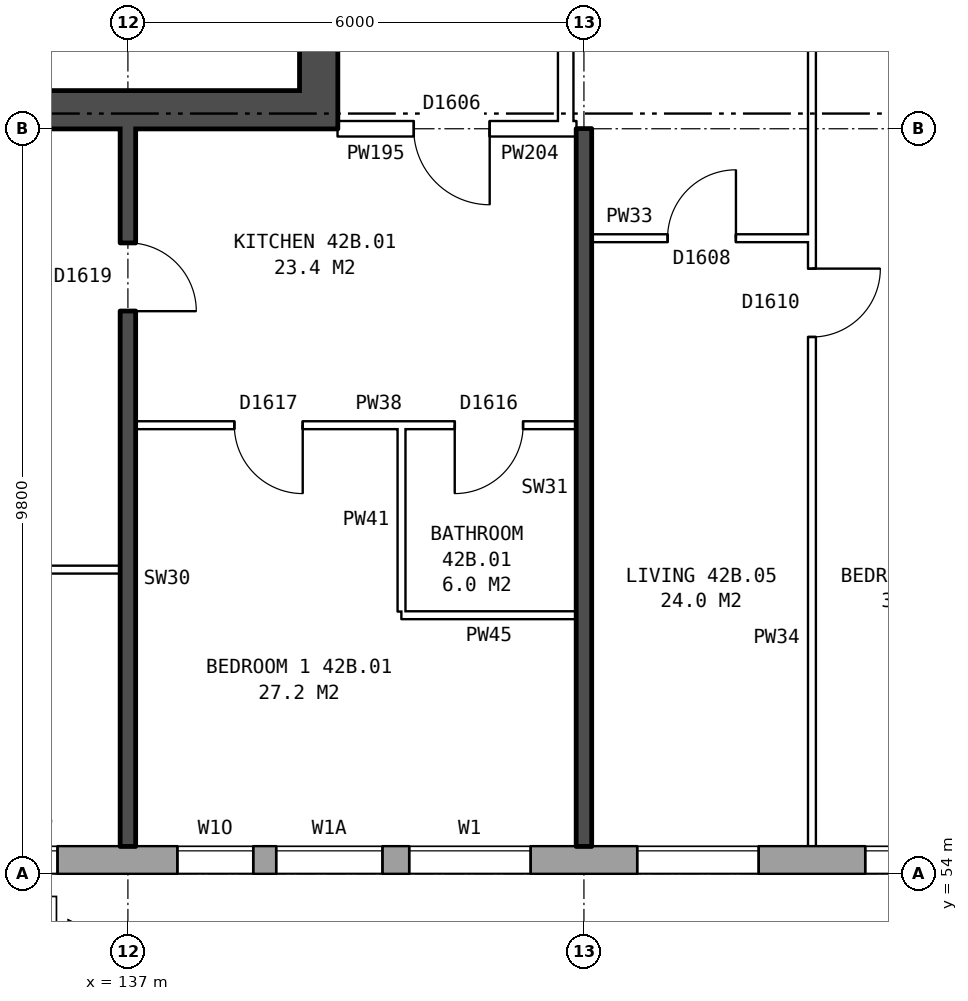
"""IFC4 building model, lengths in metres.
Left out: names, types, materials, properties, quantities, classifications, styles, units other than length and angle.
Written with IfcOpenShell. Run it as: python <this file> out.ifc"""

import sys

from ifc_helpers import new_model, si_unit, direction, frame, frame_2d, origin, place, context, subcontext, project, spatial, rectangle, extrude, element, fill, save


model = new_model("IFC4")
c1 = context("Model", 3, precision=1e-05, world=origin(), true_north=direction((0.0, 1.0)))
c2 = subcontext(c1, "Body", "Model", "MODEL_VIEW")
j1 = project(units=[si_unit("LENGTHUNIT", "METRE"), si_unit("PLANEANGLEUNIT", "RADIAN")], contexts=[c1])
p1 = place(None, origin())
s1 = spatial("IfcSite", under=j1, at=p1, CompositionType="ELEMENT")
p2 = place(p1, origin())
s2 = spatial("IfcBuilding", under=s1, at=p2, CompositionType="ELEMENT")
p3 = place(p2, frame((0.0, 0.0, 151.6)))
s3 = spatial("IfcBuildingStorey", under=s2, at=p3, CompositionType="ELEMENT", Elevation=151.6)
p4 = place(p3, frame((134.075, 54.18, 0.0), z_axis=(0.0, 0.0, 1.0), x_axis=(1.0, 0.0, 0.0)))
e1 = element("IfcWall", 1, at=p4, inside=s3, PredefinedType="STANDARD", context=c2, shape_type="SweptSolid", body=[
    extrude(rectangle(XDim=34.351, YDim=0.36, at=frame_2d((17.175, 0.0))), origin(), (0.0, 0.0, 1.0), 2.85),
])
p5 = place(p4, frame((0.3, 0.0, 0.8)))
e2 = element("IfcOpeningElement", 2, at=p5, cuts=e1, PredefinedType="OPENING", context=c2, shape_type="SweptSolid", body=[
    extrude(rectangle(XDim=0.8, YDim=1.8, at=frame_2d((0.4, 0.9))), frame((0.0, 0.19, 0.0), z_axis=(0.0, -1.0, 0.0), x_axis=(1.0, 0.0, 0.0)), (0.0, 0.0, 1.0), 0.38),
])
p6 = place(p4, frame((3.575, 0.0, 0.8)))
e3 = element("IfcOpeningElement", 3, at=p6, cuts=e1, PredefinedType="OPENING", context=c2, shape_type="SweptSolid", body=[
    extrude(rectangle(XDim=1.0, YDim=1.2, at=frame_2d((0.5, 0.6))), frame((0.0, 0.19, 0.0), z_axis=(0.0, -1.0, 0.0), x_axis=(1.0, 0.0, 0.0)), (0.0, 0.0, 1.0), 0.38),
])
p7 = place(p4, frame((6.625, 0.0, 0.8)))
e4 = element("IfcOpeningElement", 4, at=p7, cuts=e1, PredefinedType="OPENING", context=c2, shape_type="SweptSolid", body=[
    extrude(rectangle(XDim=1.6, YDim=1.8, at=frame_2d((0.8, 0.9))), frame((0.0, 0.19, 0.0), z_axis=(0.0, -1.0, 0.0), x_axis=(1.0, 0.0, 0.0)), (0.0, 0.0, 1.0), 0.38),
])
p8 = place(p4, frame((9.625, 0.0, 0.8)))
e5 = element("IfcOpeningElement", 5, at=p8, cuts=e1, PredefinedType="OPENING", context=c2, shape_type="SweptSolid", body=[
    extrude(rectangle(XDim=1.6, YDim=1.8, at=frame_2d((0.8, 0.9))), frame((0.0, 0.19, 0.0), z_axis=(0.0, -1.0, 0.0), x_axis=(1.0, 0.0, 0.0)), (0.0, 0.0, 1.0), 0.38),
])
p9 = place(p4, frame((12.625, 0.0, 0.8)))
e6 = element("IfcOpeningElement", 6, at=p9, cuts=e1, PredefinedType="OPENING", context=c2, shape_type="SweptSolid", body=[
    extrude(rectangle(XDim=1.6, YDim=1.8, at=frame_2d((0.8, 0.9))), frame((0.0, 0.19, 0.0), z_axis=(0.0, -1.0, 0.0), x_axis=(1.0, 0.0, 0.0)), (0.0, 0.0, 1.0), 0.38),
])
p10 = place(p4, frame((15.625, 0.0, 0.8)))
e7 = element("IfcOpeningElement", 7, at=p10, cuts=e1, PredefinedType="OPENING", context=c2, shape_type="SweptSolid", body=[
    extrude(rectangle(XDim=1.6, YDim=1.8, at=frame_2d((0.8, 0.9))), frame((0.0, 0.19, 0.0), z_axis=(0.0, -1.0, 0.0), x_axis=(1.0, 0.0, 0.0)), (0.0, 0.0, 1.0), 0.38),
])
p11 = place(p4, frame((18.625, 0.0, 0.8)))
e8 = element("IfcOpeningElement", 8, at=p11, cuts=e1, PredefinedType="OPENING", context=c2, shape_type="SweptSolid", body=[
    extrude(rectangle(XDim=1.6, YDim=1.8, at=frame_2d((0.8, 0.9))), frame((0.0, 0.19, 0.0), z_axis=(0.0, -1.0, 0.0), x_axis=(1.0, 0.0, 0.0)), (0.0, 0.0, 1.0), 0.38),
])
p12 = place(p4, frame((21.625, 0.0, 0.8)))
e9 = element("IfcOpeningElement", 9, at=p12, cuts=e1, PredefinedType="OPENING", context=c2, shape_type="SweptSolid", body=[
    extrude(rectangle(XDim=1.6, YDim=1.8, at=frame_2d((0.8, 0.9))), frame((0.0, 0.19, 0.0), z_axis=(0.0, -1.0, 0.0), x_axis=(1.0, 0.0, 0.0)), (0.0, 0.0, 1.0), 0.38),
])
p13 = place(p4, frame((24.625, 0.0, 0.8)))
e10 = element("IfcOpeningElement", 10, at=p13, cuts=e1, PredefinedType="OPENING", context=c2, shape_type="SweptSolid", body=[
    extrude(rectangle(XDim=1.6, YDim=1.8, at=frame_2d((0.8, 0.9))), frame((0.0, 0.19, 0.0), z_axis=(0.0, -1.0, 0.0), x_axis=(1.0, 0.0, 0.0)), (0.0, 0.0, 1.0), 0.38),
])
p14 = place(p4, frame((27.625, 0.0, 0.8)))
e11 = element("IfcOpeningElement", 11, at=p14, cuts=e1, PredefinedType="OPENING", context=c2, shape_type="SweptSolid", body=[
    extrude(rectangle(XDim=1.6, YDim=1.8, at=frame_2d((0.8, 0.9))), frame((0.0, 0.19, 0.0), z_axis=(0.0, -1.0, 0.0), x_axis=(1.0, 0.0, 0.0)), (0.0, 0.0, 1.0), 0.38),
])
p15 = place(p4, frame((29.525, 0.0, 0.8)))
e12 = element("IfcOpeningElement", 12, at=p15, cuts=e1, PredefinedType="OPENING", context=c2, shape_type="SweptSolid", body=[
    extrude(rectangle(XDim=0.6, YDim=1.8, at=frame_2d((0.3, 0.9))), frame((0.0, 0.19, 0.0), z_axis=(0.0, -1.0, 0.0), x_axis=(1.0, 0.0, 0.0)), (0.0, 0.0, 1.0), 0.38),
])
p16 = place(p4, frame((1.4, 0.0, 1.6)))
e13 = element("IfcOpeningElement", 13, at=p16, cuts=e1, PredefinedType="OPENING", context=c2, shape_type="SweptSolid", body=[
    extrude(rectangle(XDim=0.6, YDim=0.9, at=frame_2d((0.3, 0.45))), frame((0.0, 0.19, 0.0), z_axis=(0.0, -1.0, 0.0), x_axis=(1.0, 0.0, 0.0)), (0.0, 0.0, 1.0), 0.38),
])
p17 = place(p4, frame((4.875, 0.0, 0.8)))
e14 = element("IfcOpeningElement", 14, at=p17, cuts=e1, PredefinedType="OPENING", context=c2, shape_type="SweptSolid", body=[
    extrude(rectangle(XDim=1.4, YDim=1.8, at=frame_2d((0.7, 0.9))), frame((0.0, 0.19, 0.0), z_axis=(0.0, -1.0, 0.0), x_axis=(1.0, 0.0, 0.0)), (0.0, 0.0, 1.0), 0.38),
])
p18 = place(p4, frame((30.425, 0.0, 0.8)))
e15 = element("IfcOpeningElement", 15, at=p18, cuts=e1, PredefinedType="OPENING", context=c2, shape_type="SweptSolid", body=[
    extrude(rectangle(XDim=0.6, YDim=0.9, at=frame_2d((0.3, 0.45))), frame((0.0, 0.19, 0.0), z_axis=(0.0, -1.0, 0.0), x_axis=(1.0, 0.0, 0.0)), (0.0, 0.0, 1.0), 0.38),
])
p19 = place(p3, frame((139.51, 63.8, 0.0), z_axis=(0.0, 0.0, 1.0), x_axis=(0.0, 1.0, 0.0)))
e16 = element("IfcWall", 16, at=p19, inside=s3, PredefinedType="SHEAR", context=c2, shape_type="SweptSolid", body=[
    extrude(rectangle(XDim=12.4, YDim=0.5, at=frame_2d((6.2, 0.0))), origin(), (0.0, 0.0, 1.0), 2.85),
])
p20 = place(p19, frame((1.325, 0.0, 0.0)))
e17 = element("IfcOpeningElement", 17, at=p20, cuts=e16, PredefinedType="OPENING", context=c2, shape_type="SweptSolid", body=[
    extrude(rectangle(XDim=1.1, YDim=2.1, at=frame_2d((0.55, 1.05))), frame((0.0, 0.26, 0.0), z_axis=(0.0, -1.0, 0.0), x_axis=(1.0, 0.0, 0.0)), (0.0, 0.0, 1.0), 0.52),
])
p21 = place(p19, frame((3.6, 0.0, 0.0)))
e18 = element("IfcOpeningElement", 18, at=p21, cuts=e16, PredefinedType="OPENING", context=c2, shape_type="SweptSolid", body=[
    extrude(rectangle(XDim=1.1, YDim=2.1, at=frame_2d((0.55, 1.05))), frame((0.0, 0.26, 0.0), z_axis=(0.0, -1.0, 0.0), x_axis=(1.0, 0.0, 0.0)), (0.0, 0.0, 1.0), 0.52),
])
p22 = place(p19, frame((5.8, 0.0, 0.0)))
e19 = element("IfcOpeningElement", 19, at=p22, cuts=e16, PredefinedType="OPENING", context=c2, shape_type="SweptSolid", body=[
    extrude(rectangle(XDim=1.1, YDim=2.1, at=frame_2d((0.55, 1.05))), frame((0.0, 0.26, 0.0), z_axis=(0.0, -1.0, 0.0), x_axis=(1.0, 0.0, 0.0)), (0.0, 0.0, 1.0), 0.52),
])
p23 = place(p19, frame((9.9, 0.0, 0.0)))
e20 = element("IfcOpeningElement", 20, at=p23, cuts=e16, PredefinedType="OPENING", context=c2, shape_type="SweptSolid", body=[
    extrude(rectangle(XDim=1.1, YDim=2.1, at=frame_2d((0.55, 1.05))), frame((0.0, 0.26, 0.0), z_axis=(0.0, -1.0, 0.0), x_axis=(1.0, 0.0, 0.0)), (0.0, 0.0, 1.0), 0.52),
])
p24 = place(p19, frame((8.125, 0.0, 0.0)))
e21 = element("IfcOpeningElement", 21, at=p24, cuts=e16, PredefinedType="OPENING", context=c2, shape_type="SweptSolid", body=[
    extrude(rectangle(XDim=0.85, YDim=2.1, at=frame_2d((0.425, 1.05))), frame((0.0, 0.26, 0.0), z_axis=(0.0, -1.0, 0.0), x_axis=(1.0, 0.0, 0.0)), (0.0, 0.0, 1.0), 0.52),
])
p25 = place(p3, frame((139.26, 64.05, 0.0), z_axis=(0.0, 0.0, 1.0), x_axis=(-1.0, 0.0, 0.0)))
e22 = element("IfcWall", 22, at=p25, inside=s3, PredefinedType="SHEAR", context=c2, shape_type="SweptSolid", body=[
    extrude(rectangle(XDim=7.4, YDim=0.5, at=frame_2d((3.7, 0.0))), origin(), (0.0, 0.0, 1.0), 2.85),
])
p26 = place(p3, frame((142.76, 63.9, 0.0), z_axis=(0.0, 0.0, 1.0), x_axis=(0.0, 1.0, 0.0)))
e23 = element("IfcWall", 23, at=p26, inside=s3, PredefinedType="PARTITIONING", context=c2, shape_type="SweptSolid", body=[
    extrude(rectangle(XDim=12.2, YDim=0.2, at=frame_2d((6.1, 0.0))), origin(), (0.0, 0.0, 1.0), 2.85),
])
p27 = place(p26, frame((5.1, 0.0, 0.0)))
e24 = element("IfcOpeningElement", 24, at=p27, cuts=e23, PredefinedType="OPENING", context=c2, shape_type="SweptSolid", body=[
    extrude(rectangle(XDim=2.0, YDim=2.1, at=frame_2d((1.0, 1.05))), frame((0.0, 0.11, 0.0), z_axis=(0.0, -1.0, 0.0), x_axis=(1.0, 0.0, 0.0)), (0.0, 0.0, 1.0), 0.22),
])
p28 = place(p3, frame((140.6, 57.4, 0.0), z_axis=(0.0, 0.0, 1.0), x_axis=(1.0, 0.0, 0.0)))
e25 = element("IfcWall", 25, at=p28, inside=s3, PredefinedType="PARTITIONING", context=c2, shape_type="SweptSolid", body=[
    extrude(rectangle(XDim=2.3, YDim=0.1, at=frame_2d((1.15, 0.0))), origin(), (0.0, 0.0, 1.0), 2.85),
])
p29 = place(p3, frame((131.36, 58.0, 0.0), z_axis=(0.0, 0.0, 1.0), x_axis=(1.0, 0.0, 0.0)))
e26 = element("IfcWall", 26, at=p29, inside=s3, PredefinedType="PARTITIONING", context=c2, shape_type="SweptSolid", body=[
    extrude(rectangle(XDim=5.54, YDim=0.1, at=frame_2d((2.77, 0.0))), origin(), (0.0, 0.0, 1.0), 2.85),
])
p30 = place(p29, frame((2.32, 0.0, 0.0)))
e27 = element("IfcOpeningElement", 27, at=p30, cuts=e26, PredefinedType="OPENING", context=c2, shape_type="SweptSolid", body=[
    extrude(rectangle(XDim=0.9, YDim=2.1, at=frame_2d((0.45, 1.05))), frame((0.0, 0.06, 0.0), z_axis=(0.0, -1.0, 0.0), x_axis=(1.0, 0.0, 0.0)), (0.0, 0.0, 1.0), 0.12),
])
p31 = place(p3, frame((137.1, 59.9, 0.0), z_axis=(0.0, 0.0, 1.0), x_axis=(1.0, 0.0, 0.0)))
e28 = element("IfcWall", 28, at=p31, inside=s3, PredefinedType="PARTITIONING", context=c2, shape_type="SweptSolid", body=[
    extrude(rectangle(XDim=5.8, YDim=0.1, at=frame_2d((2.9, 0.0))), origin(), (0.0, 0.0, 1.0), 2.85),
])
p32 = place(p31, frame((1.3, 0.0, 0.0)))
e29 = element("IfcOpeningElement", 29, at=p32, cuts=e28, PredefinedType="OPENING", context=c2, shape_type="SweptSolid", body=[
    extrude(rectangle(XDim=0.9, YDim=2.1, at=frame_2d((0.45, 1.05))), frame((0.0, 0.06, 0.0), z_axis=(0.0, -1.0, 0.0), x_axis=(1.0, 0.0, 0.0)), (0.0, 0.0, 1.0), 0.12),
])
p33 = place(p31, frame((4.2, 0.0, 0.0)))
e30 = element("IfcOpeningElement", 30, at=p33, cuts=e28, PredefinedType="OPENING", context=c2, shape_type="SweptSolid", body=[
    extrude(rectangle(XDim=0.9, YDim=2.1, at=frame_2d((0.45, 1.05))), frame((0.0, 0.06, 0.0), z_axis=(0.0, -1.0, 0.0), x_axis=(1.0, 0.0, 0.0)), (0.0, 0.0, 1.0), 0.12),
])
p34 = place(p3, frame((143.1, 62.36, 0.0), z_axis=(0.0, 0.0, 1.0), x_axis=(1.0, 0.0, 0.0)))
e31 = element("IfcWall", 31, at=p34, inside=s3, PredefinedType="PARTITIONING", context=c2, shape_type="SweptSolid", body=[
    extrude(rectangle(XDim=2.9, YDim=0.1, at=frame_2d((1.45, 0.0))), origin(), (0.0, 0.0, 1.0), 2.85),
])
p35 = place(p34, frame((1.0, 0.0, 0.0)))
e32 = element("IfcOpeningElement", 32, at=p35, cuts=e31, PredefinedType="OPENING", context=c2, shape_type="SweptSolid", body=[
    extrude(rectangle(XDim=0.9, YDim=2.1, at=frame_2d((0.45, 1.05))), frame((0.0, 0.06, 0.0), z_axis=(0.0, -1.0, 0.0), x_axis=(1.0, 0.0, 0.0)), (0.0, 0.0, 1.0), 0.12),
])
p36 = place(p3, frame((139.76, 63.8, 0.0), z_axis=(0.0, 0.0, 1.0), x_axis=(1.0, 0.0, 0.0)))
e33 = element("IfcWall", 33, at=p36, inside=s3, PredefinedType="PARTITIONING", context=c2, shape_type="SweptSolid", body=[
    extrude(rectangle(XDim=3.0, YDim=0.2, at=frame_2d((1.5, 0.0))), origin(), (0.0, 0.0, 1.0), 2.85),
])
p37 = place(p36, frame((1.0, 0.0, 0.0)))
e34 = element("IfcOpeningElement", 34, at=p37, cuts=e33, PredefinedType="OPENING", context=c2, shape_type="SweptSolid", body=[
    extrude(rectangle(XDim=1.0, YDim=2.1, at=frame_2d((0.5, 1.05))), frame((0.0, 0.11, 0.0), z_axis=(0.0, -1.0, 0.0), x_axis=(1.0, 0.0, 0.0)), (0.0, 0.0, 1.0), 0.22),
])
p38 = place(p3, frame((142.76, 63.8, 0.0), z_axis=(0.0, 0.0, 1.0), x_axis=(1.0, 0.0, 0.0)))
e35 = element("IfcWall", 35, at=p38, inside=s3, PredefinedType="PARTITIONING", context=c2, shape_type="SweptSolid", body=[
    extrude(rectangle(XDim=0.14, YDim=0.2, at=frame_2d((0.07, 0.0))), origin(), (0.0, 0.0, 1.0), 2.85),
])
p39 = place(p3, frame((137.0, 54.36, 0.0), z_axis=(0.0, 0.0, 1.0), x_axis=(0.0, 1.0, 0.0)))
e36 = element("IfcWall", 36, at=p39, inside=s3, PredefinedType="SOLIDWALL", context=c2, shape_type="SweptSolid", body=[
    extrude(rectangle(XDim=9.44, YDim=0.2, at=frame_2d((4.72, 0.0))), origin(), (0.0, 0.0, 1.0), 2.85),
])
p40 = place(p39, frame((7.04, 0.0, 0.0)))
e37 = element("IfcOpeningElement", 37, at=p40, cuts=e36, PredefinedType="OPENING", context=c2, shape_type="SweptSolid", body=[
    extrude(rectangle(XDim=0.9, YDim=2.1, at=frame_2d((0.45, 1.05))), frame((0.0, 0.11, 0.0), z_axis=(0.0, -1.0, 0.0), x_axis=(1.0, 0.0, 0.0)), (0.0, 0.0, 1.0), 0.22),
])
p41 = place(p3, frame((140.6, 57.45, 0.0), z_axis=(0.0, 0.0, 1.0), x_axis=(0.0, 1.0, 0.0)))
e38 = element("IfcWall", 38, at=p41, inside=s3, PredefinedType="PARTITIONING", context=c2, shape_type="SweptSolid", body=[
    extrude(rectangle(XDim=2.4, YDim=0.1, at=frame_2d((1.2, 0.0))), origin(), (0.0, 0.0, 1.0), 2.85),
])
p42 = place(p3, frame((143.0, 54.36, 0.0), z_axis=(0.0, 0.0, 1.0), x_axis=(0.0, 1.0, 0.0)))
e39 = element("IfcWall", 39, at=p42, inside=s3, PredefinedType="SOLIDWALL", context=c2, shape_type="SweptSolid", body=[
    extrude(rectangle(XDim=9.44, YDim=0.2, at=frame_2d((4.72, 0.0))), origin(), (0.0, 0.0, 1.0), 2.85),
])
p43 = place(p3, frame((146.0, 54.36, 0.0), z_axis=(0.0, 0.0, 1.0), x_axis=(0.0, 1.0, 0.0)))
e40 = element("IfcWall", 40, at=p43, inside=s3, PredefinedType="PARTITIONING", context=c2, shape_type="SweptSolid", body=[
    extrude(rectangle(XDim=14.34, YDim=0.1, at=frame_2d((7.17, 0.0))), origin(), (0.0, 0.0, 1.0), 2.85),
])
p44 = place(p43, frame((6.7, 0.0, 0.0)))
e41 = element("IfcOpeningElement", 41, at=p44, cuts=e40, PredefinedType="OPENING", context=c2, shape_type="SweptSolid", body=[
    extrude(rectangle(XDim=0.9, YDim=2.1, at=frame_2d((0.45, 1.05))), frame((0.0, 0.06, 0.0), z_axis=(0.0, -1.0, 0.0), x_axis=(1.0, 0.0, 0.0)), (0.0, 0.0, 1.0), 0.12),
])
p45 = place(p43, frame((13.04, 0.0, 0.0)))
e42 = element("IfcOpeningElement", 42, at=p45, cuts=e40, PredefinedType="OPENING", context=c2, shape_type="SweptSolid", body=[
    extrude(rectangle(XDim=0.9, YDim=2.1, at=frame_2d((0.45, 1.05))), frame((0.0, 0.06, 0.0), z_axis=(0.0, -1.0, 0.0), x_axis=(1.0, 0.0, 0.0)), (0.0, 0.0, 1.0), 0.12),
])
p46 = place(p6, origin())
e43 = element("IfcWindow", 43, at=p46, inside=s3, PartitioningType="SINGLE_PANEL", PredefinedType="WINDOW", context=c2, shape_type="SweptSolid", body=[
    extrude(rectangle(XDim=1.0, YDim=1.2, at=frame_2d((0.5, 0.6))), frame((0.0, 0.15, 0.0), z_axis=(0.0, -1.0, 0.0), x_axis=(1.0, 0.0, 0.0)), (0.0, 0.0, 1.0), 0.06),
])
fill(e3, e43)
p47 = place(p7, origin())
e44 = element("IfcWindow", 44, at=p47, inside=s3, PartitioningType="SINGLE_PANEL", PredefinedType="WINDOW", context=c2, shape_type="SweptSolid", body=[
    extrude(rectangle(XDim=1.6, YDim=1.8, at=frame_2d((0.8, 0.9))), frame((0.0, 0.15, 0.0), z_axis=(0.0, -1.0, 0.0), x_axis=(1.0, 0.0, 0.0)), (0.0, 0.0, 1.0), 0.06),
])
fill(e4, e44)
p48 = place(p8, origin())
e45 = element("IfcWindow", 45, at=p48, inside=s3, PartitioningType="SINGLE_PANEL", PredefinedType="WINDOW", context=c2, shape_type="SweptSolid", body=[
    extrude(rectangle(XDim=1.6, YDim=1.8, at=frame_2d((0.8, 0.9))), frame((0.0, 0.15, 0.0), z_axis=(0.0, -1.0, 0.0), x_axis=(1.0, 0.0, 0.0)), (0.0, 0.0, 1.0), 0.06),
])
fill(e5, e45)
p49 = place(p9, origin())
e46 = element("IfcWindow", 46, at=p49, inside=s3, PartitioningType="SINGLE_PANEL", PredefinedType="WINDOW", context=c2, shape_type="SweptSolid", body=[
    extrude(rectangle(XDim=1.6, YDim=1.8, at=frame_2d((0.8, 0.9))), frame((0.0, 0.15, 0.0), z_axis=(0.0, -1.0, 0.0), x_axis=(1.0, 0.0, 0.0)), (0.0, 0.0, 1.0), 0.06),
])
fill(e6, e46)
p50 = place(p32, frame((0.9, 0.0, 0.0), z_axis=(0.0, 0.0, 1.0), x_axis=(-1.0, 0.0, 0.0)))
e47 = element("IfcDoor", 47, at=p50, inside=s3, OperationType="SINGLE_SWING_LEFT", PredefinedType="DOOR", context=c2, shape_type="SweptSolid", body=[
    extrude(rectangle(XDim=0.9, YDim=2.1, at=frame_2d((0.45, 1.05))), frame((0.0, 0.025, 0.0), z_axis=(0.0, -1.0, 0.0), x_axis=(1.0, 0.0, 0.0)), (0.0, 0.0, 1.0), 0.05),
])
fill(e29, e47)
p51 = place(p37, frame((1.0, 0.0, 0.0), z_axis=(0.0, 0.0, 1.0), x_axis=(-1.0, 0.0, 0.0)))
e48 = element("IfcDoor", 48, at=p51, inside=s3, OperationType="SINGLE_SWING_LEFT", PredefinedType="DOOR", context=c2, shape_type="SweptSolid", body=[
    extrude(rectangle(XDim=1.0, YDim=2.1, at=frame_2d((0.5, 1.05))), frame((0.0, 0.025, 0.0), z_axis=(0.0, -1.0, 0.0), x_axis=(1.0, 0.0, 0.0)), (0.0, 0.0, 1.0), 0.05),
])
fill(e34, e48)
p52 = place(p40, frame((0.9, 0.0, 0.0), z_axis=(0.0, 0.0, 1.0), x_axis=(-1.0, 0.0, 0.0)))
e49 = element("IfcDoor", 49, at=p52, inside=s3, OperationType="SINGLE_SWING_RIGHT", PredefinedType="DOOR", context=c2, shape_type="SweptSolid", body=[
    extrude(rectangle(XDim=0.9, YDim=2.1, at=frame_2d((0.45, 1.05))), frame((0.0, 0.025, 0.0), z_axis=(0.0, -1.0, 0.0), x_axis=(1.0, 0.0, 0.0)), (0.0, 0.0, 1.0), 0.05),
])
fill(e37, e49)
p53 = place(p33, frame((0.9, 0.0, 0.0), z_axis=(0.0, 0.0, 1.0), x_axis=(-1.0, 0.0, 0.0)))
e50 = element("IfcDoor", 50, at=p53, inside=s3, OperationType="SINGLE_SWING_RIGHT", PredefinedType="DOOR", context=c2, shape_type="SweptSolid", body=[
    extrude(rectangle(XDim=0.9, YDim=2.1, at=frame_2d((0.45, 1.05))), frame((0.0, 0.025, 0.0), z_axis=(0.0, -1.0, 0.0), x_axis=(1.0, 0.0, 0.0)), (0.0, 0.0, 1.0), 0.05),
])
fill(e30, e50)
p54 = place(p44, frame((0.9, 0.0, 0.0), z_axis=(0.0, 0.0, 1.0), x_axis=(-1.0, 0.0, 0.0)))
e51 = element("IfcDoor", 51, at=p54, inside=s3, OperationType="SINGLE_SWING_LEFT", PredefinedType="DOOR", context=c2, shape_type="SweptSolid", body=[
    extrude(rectangle(XDim=0.9, YDim=2.1, at=frame_2d((0.45, 1.05))), frame((0.0, 0.025, 0.0), z_axis=(0.0, -1.0, 0.0), x_axis=(1.0, 0.0, 0.0)), (0.0, 0.0, 1.0), 0.05),
])
fill(e41, e51)
p55 = place(p35, origin())
e52 = element("IfcDoor", 52, at=p55, inside=s3, OperationType="SINGLE_SWING_RIGHT", PredefinedType="DOOR", context=c2, shape_type="SweptSolid", body=[
    extrude(rectangle(XDim=0.9, YDim=2.1, at=frame_2d((0.45, 1.05))), frame((0.0, 0.025, 0.0), z_axis=(0.0, -1.0, 0.0), x_axis=(1.0, 0.0, 0.0)), (0.0, 0.0, 1.0), 0.05),
])
fill(e32, e52)
p56 = place(p16, origin())
e53 = element("IfcWindow", 53, at=p56, inside=s3, PartitioningType="SINGLE_PANEL", PredefinedType="WINDOW", context=c2, shape_type="SweptSolid", body=[
    extrude(rectangle(XDim=0.6, YDim=0.9, at=frame_2d((0.3, 0.45))), frame((0.0, 0.15, 0.0), z_axis=(0.0, -1.0, 0.0), x_axis=(1.0, 0.0, 0.0)), (0.0, 0.0, 1.0), 0.06),
])
fill(e13, e53)
p57 = place(p17, origin())
e54 = element("IfcWindow", 54, at=p57, inside=s3, PartitioningType="SINGLE_PANEL", PredefinedType="WINDOW", context=c2, shape_type="SweptSolid", body=[
    extrude(rectangle(XDim=1.4, YDim=1.8, at=frame_2d((0.7, 0.9))), frame((0.0, 0.15, 0.0), z_axis=(0.0, -1.0, 0.0), x_axis=(1.0, 0.0, 0.0)), (0.0, 0.0, 1.0), 0.06),
])
fill(e14, e54)
save(model, sys.argv[1])
